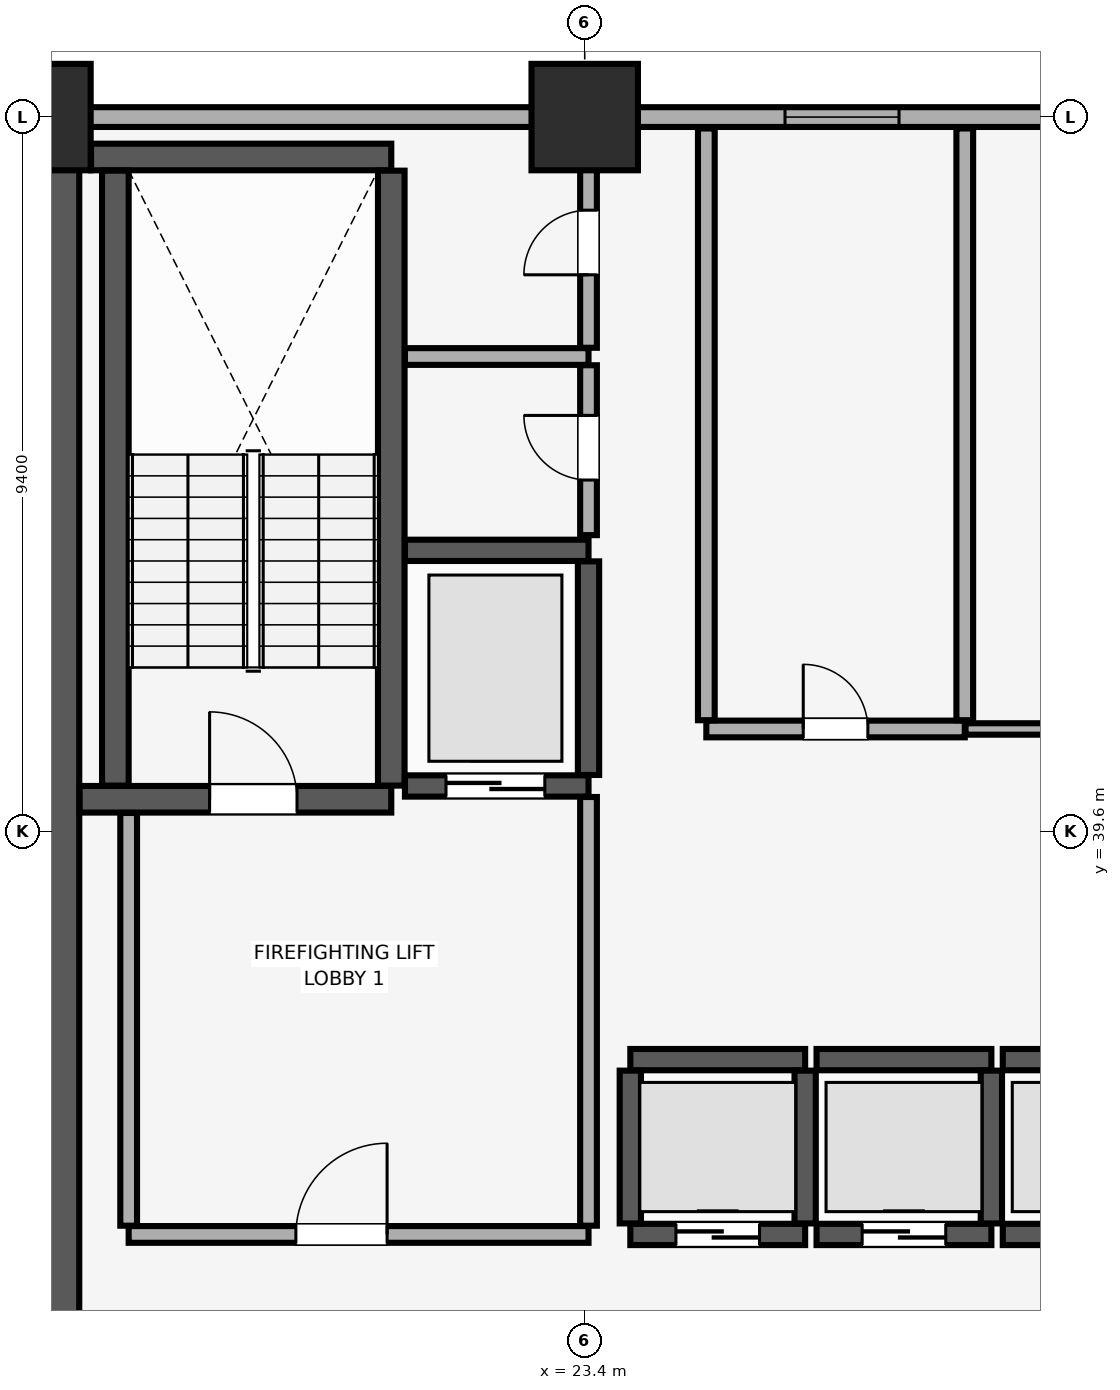
"""IFC4 building model, lengths in metres.
Left out: names, types, materials, properties, quantities, classifications, styles, units other than length and angle.
Written with IfcOpenShell. Run it as: python <this file> out.ifc"""

import sys

from ifc_helpers import new_model, si_unit, direction, frame, frame_2d, origin, origin_2d, place, context, subcontext, project, spatial, rectangle, extrude, element, fill, save


model = new_model("IFC4")
c1 = context("Model", 3, precision=1e-05, world=origin(), true_north=direction((0.0, 1.0)))
c2 = subcontext(c1, "Body", "Model", "MODEL_VIEW")
j1 = project(units=[si_unit("LENGTHUNIT", "METRE"), si_unit("PLANEANGLEUNIT", "RADIAN")], contexts=[c1])
p1 = place(None, origin())
s1 = spatial("IfcSite", under=j1, at=p1, CompositionType="ELEMENT")
p2 = place(p1, origin())
s2 = spatial("IfcBuilding", under=s1, at=p2, CompositionType="ELEMENT")
p3 = place(p2, frame((0.0, 0.0, 57.65)))
s3 = spatial("IfcBuildingStorey", under=s2, at=p3, CompositionType="ELEMENT", Elevation=57.65)
for number, where, z_axis, x_axis in (
    (1, (16.2, 49.0, 0.0), (0.0, 0.0, 1.0), (1.0, 0.0, 0.0)),
    (2, (23.4, 49.0, 0.0), (0.0, 0.0, 1.0), (1.0, 0.0, 0.0)),
):
    element("IfcColumn", number, at=place(p3, frame(where, z_axis=z_axis, x_axis=x_axis)), inside=s3, PredefinedType="COLUMN", context=c2, shape_type="SweptSolid", body=[
        extrude(rectangle(XDim=1.4, YDim=1.4, at=origin_2d()), origin(), (0.0, 0.0, 1.0), 3.51),
    ])
p4 = place(p3, frame((79.8, 49.0, 0.0), z_axis=(0.0, 0.0, 1.0), x_axis=(-1.0, 0.0, 0.0)))
e3 = element("IfcWall", 3, at=p4, inside=s3, PredefinedType="SOLIDWALL", context=c2, shape_type="SweptSolid", body=[
    extrude(rectangle(XDim=75.6, YDim=0.26, at=frame_2d((37.8, 0.0))), origin(), (0.0, 0.0, 1.0), 2.56),
])
p5 = place(p4, frame((72.565, 0.0, 0.85)))
e4 = element("IfcOpeningElement", 4, at=p5, cuts=e3, PredefinedType="OPENING", context=c2, shape_type="SweptSolid", body=[
    extrude(rectangle(XDim=1.5, YDim=1.4, at=frame_2d((0.75, 0.7))), frame((0.0, 0.14, 0.0), z_axis=(0.0, -1.0, 0.0), x_axis=(1.0, 0.0, 0.0)), (0.0, 0.0, 1.0), 0.28),
])
p6 = place(p4, frame((67.45, 0.0, 0.85)))
e5 = element("IfcOpeningElement", 5, at=p6, cuts=e3, PredefinedType="OPENING", context=c2, shape_type="SweptSolid", body=[
    extrude(rectangle(XDim=1.5, YDim=1.4, at=frame_2d((0.75, 0.7))), frame((0.0, 0.14, 0.0), z_axis=(0.0, -1.0, 0.0), x_axis=(1.0, 0.0, 0.0)), (0.0, 0.0, 1.0), 0.28),
])
p7 = place(p4, frame((7.6, 0.0, 0.85)))
e6 = element("IfcOpeningElement", 6, at=p7, cuts=e3, PredefinedType="OPENING", context=c2, shape_type="SweptSolid", body=[
    extrude(rectangle(XDim=1.5, YDim=1.4, at=frame_2d((0.75, 0.7))), frame((0.0, 0.14, 0.0), z_axis=(0.0, -1.0, 0.0), x_axis=(1.0, 0.0, 0.0)), (0.0, 0.0, 1.0), 0.28),
])
p8 = place(p4, frame((1.535, 0.0, 0.85)))
e7 = element("IfcOpeningElement", 7, at=p8, cuts=e3, PredefinedType="OPENING", context=c2, shape_type="SweptSolid", body=[
    extrude(rectangle(XDim=1.5, YDim=1.4, at=frame_2d((0.75, 0.7))), frame((0.0, 0.14, 0.0), z_axis=(0.0, -1.0, 0.0), x_axis=(1.0, 0.0, 0.0)), (0.0, 0.0, 1.0), 0.28),
])
p9 = place(p4, frame((52.265, 0.0, 0.9)))
e8 = element("IfcOpeningElement", 8, at=p9, cuts=e3, PredefinedType="OPENING", context=c2, shape_type="SweptSolid", body=[
    extrude(rectangle(XDim=1.5, YDim=1.4, at=frame_2d((0.75, 0.7))), frame((0.0, 0.14, 0.0), z_axis=(0.0, -1.0, 0.0), x_axis=(1.0, 0.0, 0.0)), (0.0, 0.0, 1.0), 0.28),
])
p10 = place(p4, frame((45.5, 0.0, 0.9)))
e9 = element("IfcOpeningElement", 9, at=p10, cuts=e3, PredefinedType="OPENING", context=c2, shape_type="SweptSolid", body=[
    extrude(rectangle(XDim=1.5, YDim=1.4, at=frame_2d((0.75, 0.7))), frame((0.0, 0.14, 0.0), z_axis=(0.0, -1.0, 0.0), x_axis=(1.0, 0.0, 0.0)), (0.0, 0.0, 1.0), 0.28),
])
p11 = place(p4, frame((31.05, 0.0, 0.9)))
e10 = element("IfcOpeningElement", 10, at=p11, cuts=e3, PredefinedType="OPENING", context=c2, shape_type="SweptSolid", body=[
    extrude(rectangle(XDim=1.5, YDim=1.4, at=frame_2d((0.75, 0.7))), frame((0.0, 0.14, 0.0), z_axis=(0.0, -1.0, 0.0), x_axis=(1.0, 0.0, 0.0)), (0.0, 0.0, 1.0), 0.28),
])
p12 = place(p4, frame((27.85, 0.0, 0.9)))
e11 = element("IfcOpeningElement", 11, at=p12, cuts=e3, PredefinedType="OPENING", context=c2, shape_type="SweptSolid", body=[
    extrude(rectangle(XDim=1.5, YDim=1.4, at=frame_2d((0.75, 0.7))), frame((0.0, 0.14, 0.0), z_axis=(0.0, -1.0, 0.0), x_axis=(1.0, 0.0, 0.0)), (0.0, 0.0, 1.0), 0.28),
])
p13 = place(p4, frame((23.485, 0.0, 0.9)))
e12 = element("IfcOpeningElement", 12, at=p13, cuts=e3, PredefinedType="OPENING", context=c2, shape_type="SweptSolid", body=[
    extrude(rectangle(XDim=1.5, YDim=1.4, at=frame_2d((0.75, 0.7))), frame((0.0, 0.14, 0.0), z_axis=(0.0, -1.0, 0.0), x_axis=(1.0, 0.0, 0.0)), (0.0, 0.0, 1.0), 0.28),
])
p14 = place(p3, frame((16.2, 29.4, 0.0), z_axis=(0.0, 0.0, 1.0), x_axis=(0.0, 1.0, 0.0)))
e13 = element("IfcWall", 13, at=p14, inside=s3, PredefinedType="SHEAR", context=c2, shape_type="SweptSolid", body=[
    extrude(rectangle(XDim=19.2, YDim=1.1, at=frame_2d((9.6, 0.0))), origin(), (0.0, 0.0, 1.0), 3.51),
])
p15 = place(p3, frame((16.755, 40.025, 0.0), z_axis=(0.0, 0.0, 1.0), x_axis=(1.0, 0.0, 0.0)))
e14 = element("IfcWall", 14, at=p15, inside=s3, PredefinedType="SHEAR", context=c2, shape_type="SweptSolid", body=[
    extrude(rectangle(XDim=4.1, YDim=0.35, at=frame_2d((2.05, 0.0))), origin(), (0.0, 0.0, 1.0), 3.51),
])
p16 = place(p15, frame((1.71, 0.0, 0.0)))
e15 = element("IfcOpeningElement", 15, at=p16, cuts=e14, PredefinedType="OPENING", context=c2, shape_type="SweptSolid", body=[
    extrude(rectangle(XDim=1.15, YDim=2.15, at=frame_2d((0.575, 1.075))), frame((0.0, 0.185, 0.0), z_axis=(0.0, -1.0, 0.0), x_axis=(1.0, 0.0, 0.0)), (0.0, 0.0, 1.0), 0.37),
])
p17 = place(p3, frame((16.905, 48.475, 0.0), z_axis=(0.0, 0.0, 1.0), x_axis=(1.0, 0.0, 0.0)))
e16 = element("IfcWall", 16, at=p17, inside=s3, PredefinedType="SHEAR", context=c2, shape_type="SweptSolid", body=[
    extrude(rectangle(XDim=3.95, YDim=0.35, at=frame_2d((1.975, 0.0))), origin(), (0.0, 0.0, 1.0), 3.51),
])
for number, where, z_axis, x_axis in (
    (17, (17.225, 40.205, 0.0), (0.0, 0.0, 1.0), (0.0, 1.0, 0.0)),
    (18, (20.855, 40.205, 0.0), (0.0, 0.0, 1.0), (0.0, 1.0, 0.0)),
):
    element("IfcWall", number, at=place(p3, frame(where, z_axis=z_axis, x_axis=x_axis)), inside=s3, PredefinedType="SHEAR", context=c2, shape_type="SweptSolid", body=[
        extrude(rectangle(XDim=8.09, YDim=0.35, at=frame_2d((4.045, 0.0))), origin(), (0.0, 0.0, 1.0), 3.51),
    ])
p18 = place(p3, frame((24.0, 34.3, 0.0), z_axis=(0.0, 0.0, 1.0), x_axis=(1.0, 0.0, 0.0)))
e19 = element("IfcWall", 19, at=p18, inside=s3, PredefinedType="SHEAR", context=c2, shape_type="SweptSolid", body=[
    extrude(rectangle(XDim=2.3, YDim=0.28, at=frame_2d((1.15, 0.0))), origin(), (0.0, 0.0, 1.0), 3.51),
])
p19 = place(p18, frame((0.6, 0.0, 0.0)))
e20 = element("IfcOpeningElement", 20, at=p19, cuts=e19, PredefinedType="OPENING", context=c2, shape_type="SweptSolid", body=[
    extrude(rectangle(XDim=1.1, YDim=2.2, at=frame_2d((0.55, 1.1))), frame((0.0, 0.15, 0.0), z_axis=(0.0, -1.0, 0.0), x_axis=(1.0, 0.0, 0.0)), (0.0, 0.0, 1.0), 0.3),
])
p20 = place(p3, frame((24.0, 36.6, 0.0), z_axis=(0.0, 0.0, 1.0), x_axis=(1.0, 0.0, 0.0)))
e21 = element("IfcWall", 21, at=p20, inside=s3, PredefinedType="SHEAR", context=c2, shape_type="SweptSolid", body=[
    extrude(rectangle(XDim=2.3, YDim=0.28, at=frame_2d((1.15, 0.0))), origin(), (0.0, 0.0, 1.0), 3.51),
])
for number, where, z_axis, x_axis in (
    (22, (24.0, 34.445, 0.0), (0.0, 0.0, 1.0), (0.0, 1.0, 0.0)),
    (23, (26.3, 34.445, 0.0), (0.0, 0.0, 1.0), (0.0, 1.0, 0.0)),
):
    element("IfcWall", number, at=place(p3, frame(where, z_axis=z_axis, x_axis=x_axis)), inside=s3, PredefinedType="SHEAR", context=c2, shape_type="SweptSolid", body=[
        extrude(rectangle(XDim=2.01, YDim=0.28, at=frame_2d((1.005, 0.0))), origin(), (0.0, 0.0, 1.0), 3.51),
    ])
p21 = place(p3, frame((26.45, 34.3, 0.0), z_axis=(0.0, 0.0, 1.0), x_axis=(1.0, 0.0, 0.0)))
e24 = element("IfcWall", 24, at=p21, inside=s3, PredefinedType="SHEAR", context=c2, shape_type="SweptSolid", body=[
    extrude(rectangle(XDim=2.3, YDim=0.28, at=frame_2d((1.15, 0.0))), origin(), (0.0, 0.0, 1.0), 3.51),
])
p22 = place(p21, frame((0.6, 0.0, 0.0)))
e25 = element("IfcOpeningElement", 25, at=p22, cuts=e24, PredefinedType="OPENING", context=c2, shape_type="SweptSolid", body=[
    extrude(rectangle(XDim=1.1, YDim=2.2, at=frame_2d((0.55, 1.1))), frame((0.0, 0.15, 0.0), z_axis=(0.0, -1.0, 0.0), x_axis=(1.0, 0.0, 0.0)), (0.0, 0.0, 1.0), 0.3),
])
p23 = place(p3, frame((26.45, 36.6, 0.0), z_axis=(0.0, 0.0, 1.0), x_axis=(1.0, 0.0, 0.0)))
e26 = element("IfcWall", 26, at=p23, inside=s3, PredefinedType="SHEAR", context=c2, shape_type="SweptSolid", body=[
    extrude(rectangle(XDim=2.3, YDim=0.28, at=frame_2d((1.15, 0.0))), origin(), (0.0, 0.0, 1.0), 3.51),
])
p24 = place(p3, frame((28.75, 34.445, 0.0), z_axis=(0.0, 0.0, 1.0), x_axis=(0.0, 1.0, 0.0)))
e27 = element("IfcWall", 27, at=p24, inside=s3, PredefinedType="SHEAR", context=c2, shape_type="SweptSolid", body=[
    extrude(rectangle(XDim=2.01, YDim=0.28, at=frame_2d((1.005, 0.0))), origin(), (0.0, 0.0, 1.0), 3.51),
])
p25 = place(p3, frame((28.9, 34.3, 0.0), z_axis=(0.0, 0.0, 1.0), x_axis=(1.0, 0.0, 0.0)))
e28 = element("IfcWall", 28, at=p25, inside=s3, PredefinedType="SHEAR", context=c2, shape_type="SweptSolid", body=[
    extrude(rectangle(XDim=2.3, YDim=0.28, at=frame_2d((1.15, 0.0))), origin(), (0.0, 0.0, 1.0), 3.51),
])
p26 = place(p25, frame((0.6, 0.0, 0.0)))
e29 = element("IfcOpeningElement", 29, at=p26, cuts=e28, PredefinedType="OPENING", context=c2, shape_type="SweptSolid", body=[
    extrude(rectangle(XDim=1.1, YDim=2.2, at=frame_2d((0.55, 1.1))), frame((0.0, 0.15, 0.0), z_axis=(0.0, -1.0, 0.0), x_axis=(1.0, 0.0, 0.0)), (0.0, 0.0, 1.0), 0.3),
])
p27 = place(p3, frame((28.9, 36.6, 0.0), z_axis=(0.0, 0.0, 1.0), x_axis=(1.0, 0.0, 0.0)))
e30 = element("IfcWall", 30, at=p27, inside=s3, PredefinedType="SHEAR", context=c2, shape_type="SweptSolid", body=[
    extrude(rectangle(XDim=2.3, YDim=0.28, at=frame_2d((1.15, 0.0))), origin(), (0.0, 0.0, 1.0), 3.51),
])
p28 = place(p3, frame((21.035, 40.2, 0.0), z_axis=(0.0, 0.0, 1.0), x_axis=(1.0, 0.0, 0.0)))
e31 = element("IfcWall", 31, at=p28, inside=s3, PredefinedType="SHEAR", context=c2, shape_type="SweptSolid", body=[
    extrude(rectangle(XDim=2.415, YDim=0.28, at=frame_2d((1.208, 0.0))), origin(), (0.0, 0.0, 1.0), 3.51),
])
p29 = place(p28, frame((0.54, 0.0, 0.0)))
e32 = element("IfcOpeningElement", 32, at=p29, cuts=e31, PredefinedType="OPENING", context=c2, shape_type="SweptSolid", body=[
    extrude(rectangle(XDim=1.3, YDim=2.3, at=frame_2d((0.65, 1.15))), frame((0.0, 0.15, 0.0), z_axis=(0.0, -1.0, 0.0), x_axis=(1.0, 0.0, 0.0)), (0.0, 0.0, 1.0), 0.3),
])
p30 = place(p3, frame((21.035, 43.3, 0.0), z_axis=(0.0, 0.0, 1.0), x_axis=(1.0, 0.0, 0.0)))
e33 = element("IfcWall", 33, at=p30, inside=s3, PredefinedType="SHEAR", context=c2, shape_type="SweptSolid", body=[
    extrude(rectangle(XDim=2.415, YDim=0.28, at=frame_2d((1.208, 0.0))), origin(), (0.0, 0.0, 1.0), 3.51),
])
p31 = place(p3, frame((23.45, 40.345, 0.0), z_axis=(0.0, 0.0, 1.0), x_axis=(0.0, 1.0, 0.0)))
e34 = element("IfcWall", 34, at=p31, inside=s3, PredefinedType="SHEAR", context=c2, shape_type="SweptSolid", body=[
    extrude(rectangle(XDim=2.81, YDim=0.28, at=frame_2d((1.405, 0.0))), origin(), (0.0, 0.0, 1.0), 3.51),
])
p32 = place(p3, frame((17.4, 34.3, 0.0), z_axis=(0.0, 0.0, 1.0), x_axis=(1.0, 0.0, 0.0)))
e35 = element("IfcWall", 35, at=p32, inside=s3, PredefinedType="PARTITIONING", context=c2, shape_type="SweptSolid", body=[
    extrude(rectangle(XDim=6.05, YDim=0.22, at=frame_2d((3.025, 0.0))), origin(), (0.0, 0.0, 1.0), 3.51),
])
p33 = place(p32, frame((2.2, 0.0, 0.0)))
e36 = element("IfcOpeningElement", 36, at=p33, cuts=e35, PredefinedType="OPENING", context=c2, shape_type="SweptSolid", body=[
    extrude(rectangle(XDim=1.2, YDim=2.15, at=frame_2d((0.6, 1.075))), frame((0.0, 0.12, 0.0), z_axis=(0.0, -1.0, 0.0), x_axis=(1.0, 0.0, 0.0)), (0.0, 0.0, 1.0), 0.24),
])
p34 = place(p3, frame((17.4, 34.415, 0.0), z_axis=(0.0, 0.0, 1.0), x_axis=(0.0, 1.0, 0.0)))
e37 = element("IfcWall", 37, at=p34, inside=s3, PredefinedType="PARTITIONING", context=c2, shape_type="SweptSolid", body=[
    extrude(rectangle(XDim=5.43, YDim=0.22, at=frame_2d((2.715, 0.0))), origin(), (0.0, 0.0, 1.0), 3.51),
])
p35 = place(p3, frame((23.45, 34.415, 0.0), z_axis=(0.0, 0.0, 1.0), x_axis=(0.0, 1.0, 0.0)))
e38 = element("IfcWall", 38, at=p35, inside=s3, PredefinedType="PARTITIONING", context=c2, shape_type="SweptSolid", body=[
    extrude(rectangle(XDim=5.64, YDim=0.22, at=frame_2d((2.82, 0.0))), origin(), (0.0, 0.0, 1.0), 3.51),
])
p36 = place(p3, frame((21.035, 45.85, 0.0), z_axis=(0.0, 0.0, 1.0), x_axis=(1.0, 0.0, 0.0)))
e39 = element("IfcWall", 39, at=p36, inside=s3, PredefinedType="PARTITIONING", context=c2, shape_type="SweptSolid", body=[
    extrude(rectangle(XDim=2.415, YDim=0.22, at=frame_2d((1.208, 0.0))), origin(), (0.0, 0.0, 1.0), 3.51),
])
p37 = place(p3, frame((23.45, 43.5, 0.0), z_axis=(0.0, 0.0, 1.0), x_axis=(0.0, 1.0, 0.0)))
e40 = element("IfcWall", 40, at=p37, inside=s3, PredefinedType="PARTITIONING", context=c2, shape_type="SweptSolid", body=[
    extrude(rectangle(XDim=2.235, YDim=0.22, at=frame_2d((1.118, 0.0))), origin(), (0.0, 0.0, 1.0), 3.51),
])
p38 = place(p37, frame((0.725, 0.0, 0.0)))
e41 = element("IfcOpeningElement", 41, at=p38, cuts=e40, PredefinedType="OPENING", context=c2, shape_type="SweptSolid", body=[
    extrude(rectangle(XDim=0.85, YDim=2.1, at=frame_2d((0.425, 1.05))), frame((0.0, 0.12, 0.0), z_axis=(0.0, -1.0, 0.0), x_axis=(1.0, 0.0, 0.0)), (0.0, 0.0, 1.0), 0.24),
])
p39 = place(p3, frame((23.45, 45.965, 0.0), z_axis=(0.0, 0.0, 1.0), x_axis=(0.0, 1.0, 0.0)))
e42 = element("IfcWall", 42, at=p39, inside=s3, PredefinedType="PARTITIONING", context=c2, shape_type="SweptSolid", body=[
    extrude(rectangle(XDim=2.885, YDim=0.22, at=frame_2d((1.442, 0.0))), origin(), (0.0, 0.0, 1.0), 3.51),
])
p40 = place(p39, frame((0.96, 0.0, 0.0)))
e43 = element("IfcOpeningElement", 43, at=p40, cuts=e42, PredefinedType="OPENING", context=c2, shape_type="SweptSolid", body=[
    extrude(rectangle(XDim=0.85, YDim=2.1, at=frame_2d((0.425, 1.05))), frame((0.0, 0.12, 0.0), z_axis=(0.0, -1.0, 0.0), x_axis=(1.0, 0.0, 0.0)), (0.0, 0.0, 1.0), 0.24),
])
p41 = place(p3, frame((25.0, 40.95, 0.0), z_axis=(0.0, 0.0, 1.0), x_axis=(1.0, 0.0, 0.0)))
e44 = element("IfcWall", 44, at=p41, inside=s3, PredefinedType="PARTITIONING", context=c2, shape_type="SweptSolid", body=[
    extrude(rectangle(XDim=3.4, YDim=0.22, at=frame_2d((1.7, 0.0))), origin(), (0.0, 0.0, 1.0), 3.51),
])
p42 = place(p41, frame((1.275, 0.0, 0.0)))
e45 = element("IfcOpeningElement", 45, at=p42, cuts=e44, PredefinedType="OPENING", context=c2, shape_type="SweptSolid", body=[
    extrude(rectangle(XDim=0.85, YDim=2.1, at=frame_2d((0.425, 1.05))), frame((0.0, 0.12, 0.0), z_axis=(0.0, -1.0, 0.0), x_axis=(1.0, 0.0, 0.0)), (0.0, 0.0, 1.0), 0.24),
])
for number, where, z_axis, x_axis in (
    (46, (25.0, 41.065, 0.0), (0.0, 0.0, 1.0), (0.0, 1.0, 0.0)),
    (47, (28.4, 41.065, 0.0), (0.0, 0.0, 1.0), (0.0, 1.0, 0.0)),
):
    element("IfcWall", number, at=place(p3, frame(where, z_axis=z_axis, x_axis=x_axis)), inside=s3, PredefinedType="PARTITIONING", context=c2, shape_type="SweptSolid", body=[
        extrude(rectangle(XDim=7.785, YDim=0.22, at=frame_2d((3.893, 0.0))), origin(), (0.0, 0.0, 1.0), 3.51),
    ])
p43 = place(p3, frame((28.41, 40.95, 0.0), z_axis=(0.0, 0.0, 1.0), x_axis=(1.0, 0.0, 0.0)))
e48 = element("IfcWall", 48, at=p43, inside=s3, PredefinedType="PARTITIONING", context=c2, shape_type="SweptSolid", body=[
    extrude(rectangle(XDim=7.69, YDim=0.15, at=frame_2d((3.845, 0.0))), origin(), (0.0, 0.0, 1.0), 3.51),
])
p44 = place(p43, frame((3.415, 0.0, 0.0)))
e49 = element("IfcOpeningElement", 49, at=p44, cuts=e48, PredefinedType="OPENING", context=c2, shape_type="SweptSolid", body=[
    extrude(rectangle(XDim=0.85, YDim=2.1, at=frame_2d((0.425, 1.05))), frame((0.0, 0.085, 0.0), z_axis=(0.0, -1.0, 0.0), x_axis=(1.0, 0.0, 0.0)), (0.0, 0.0, 1.0), 0.17),
])
p45 = place(p9, origin())
e50 = element("IfcWindow", 50, at=p45, inside=s3, PartitioningType="SINGLE_PANEL", PredefinedType="WINDOW", context=c2, shape_type="SweptSolid", body=[
    extrude(rectangle(XDim=1.5, YDim=1.4, at=frame_2d((0.75, 0.7))), frame((0.0, 0.03, 0.0), z_axis=(0.0, -1.0, 0.0), x_axis=(1.0, 0.0, 0.0)), (0.0, 0.0, 1.0), 0.06),
])
fill(e8, e50)
p46 = place(p16, origin())
e51 = element("IfcDoor", 51, at=p46, inside=s3, OperationType="SINGLE_SWING_LEFT", PredefinedType="DOOR", context=c2, shape_type="SweptSolid", body=[
    extrude(rectangle(XDim=1.15, YDim=2.15, at=frame_2d((0.575, 1.075))), frame((0.0, 0.025, 0.0), z_axis=(0.0, -1.0, 0.0), x_axis=(1.0, 0.0, 0.0)), (0.0, 0.0, 1.0), 0.05),
])
fill(e15, e51)
p47 = place(p19, origin())
e52 = element("IfcDoor", 52, at=p47, inside=s3, OperationType="DOUBLE_DOOR_SLIDING", PredefinedType="DOOR", context=c2, shape_type="SweptSolid", body=[
    extrude(rectangle(XDim=1.1, YDim=2.2, at=frame_2d((0.55, 1.1))), frame((0.0, 0.025, 0.0), z_axis=(0.0, -1.0, 0.0), x_axis=(1.0, 0.0, 0.0)), (0.0, 0.0, 1.0), 0.05),
])
fill(e20, e52)
p48 = place(p22, origin())
e53 = element("IfcDoor", 53, at=p48, inside=s3, OperationType="DOUBLE_DOOR_SLIDING", PredefinedType="DOOR", context=c2, shape_type="SweptSolid", body=[
    extrude(rectangle(XDim=1.1, YDim=2.2, at=frame_2d((0.55, 1.1))), frame((0.0, 0.025, 0.0), z_axis=(0.0, -1.0, 0.0), x_axis=(1.0, 0.0, 0.0)), (0.0, 0.0, 1.0), 0.05),
])
fill(e25, e53)
p49 = place(p29, origin())
e54 = element("IfcDoor", 54, at=p49, inside=s3, OperationType="DOUBLE_DOOR_SLIDING", PredefinedType="DOOR", context=c2, shape_type="SweptSolid", body=[
    extrude(rectangle(XDim=1.3, YDim=2.3, at=frame_2d((0.65, 1.15))), frame((0.0, 0.025, 0.0), z_axis=(0.0, -1.0, 0.0), x_axis=(1.0, 0.0, 0.0)), (0.0, 0.0, 1.0), 0.05),
])
fill(e32, e54)
p50 = place(p33, origin())
e55 = element("IfcDoor", 55, at=p50, inside=s3, OperationType="SINGLE_SWING_RIGHT", PredefinedType="DOOR", context=c2, shape_type="SweptSolid", body=[
    extrude(rectangle(XDim=1.2, YDim=2.15, at=frame_2d((0.6, 1.075))), frame((0.0, 0.025, 0.0), z_axis=(0.0, -1.0, 0.0), x_axis=(1.0, 0.0, 0.0)), (0.0, 0.0, 1.0), 0.05),
])
fill(e36, e55)
p51 = place(p38, origin())
e56 = element("IfcDoor", 56, at=p51, inside=s3, OperationType="SINGLE_SWING_RIGHT", PredefinedType="DOOR", context=c2, shape_type="SweptSolid", body=[
    extrude(rectangle(XDim=0.85, YDim=2.1, at=frame_2d((0.425, 1.05))), frame((0.0, 0.025, 0.0), z_axis=(0.0, -1.0, 0.0), x_axis=(1.0, 0.0, 0.0)), (0.0, 0.0, 1.0), 0.05),
])
fill(e41, e56)
p52 = place(p40, origin())
e57 = element("IfcDoor", 57, at=p52, inside=s3, OperationType="SINGLE_SWING_LEFT", PredefinedType="DOOR", context=c2, shape_type="SweptSolid", body=[
    extrude(rectangle(XDim=0.85, YDim=2.1, at=frame_2d((0.425, 1.05))), frame((0.0, 0.025, 0.0), z_axis=(0.0, -1.0, 0.0), x_axis=(1.0, 0.0, 0.0)), (0.0, 0.0, 1.0), 0.05),
])
fill(e43, e57)
p53 = place(p42, origin())
e58 = element("IfcDoor", 58, at=p53, inside=s3, OperationType="SINGLE_SWING_LEFT", PredefinedType="DOOR", context=c2, shape_type="SweptSolid", body=[
    extrude(rectangle(XDim=0.85, YDim=2.1, at=frame_2d((0.425, 1.05))), frame((0.0, 0.025, 0.0), z_axis=(0.0, -1.0, 0.0), x_axis=(1.0, 0.0, 0.0)), (0.0, 0.0, 1.0), 0.05),
])
fill(e45, e58)
save(model, sys.argv[1])
